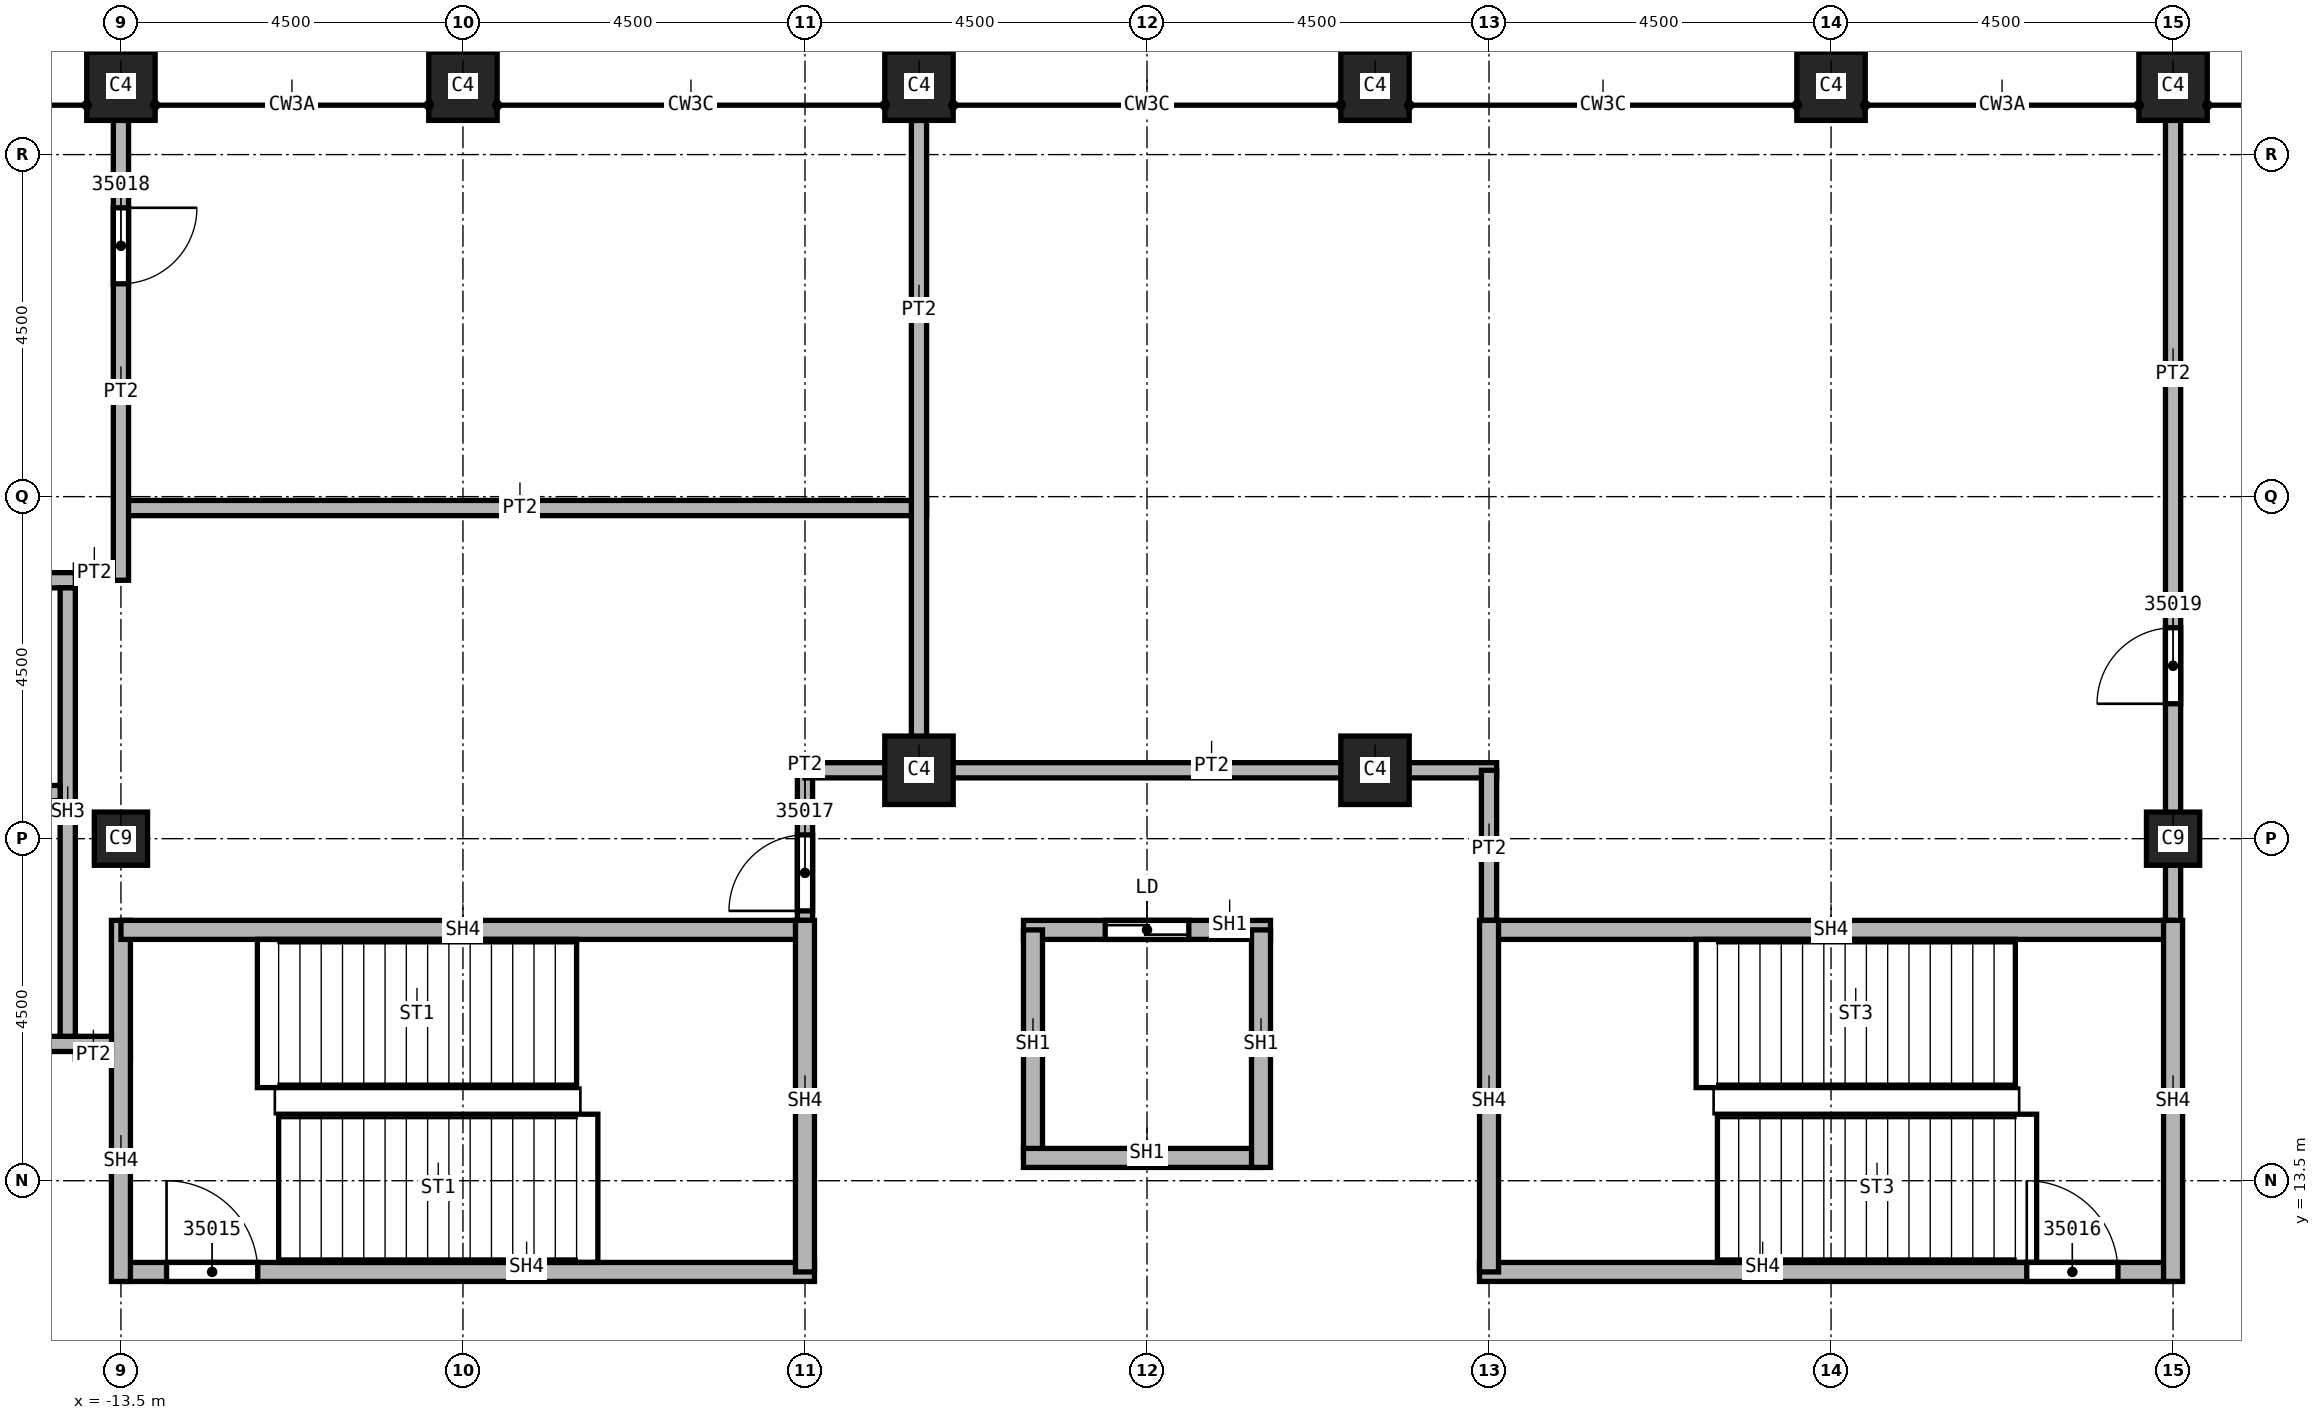
"""IFC4 building model, lengths in metres.
Left out: names, types, materials, properties, quantities, classifications, styles, units other than length and angle.
Written with IfcOpenShell. Run it as: python <this file> out.ifc"""

import sys

from ifc_helpers import new_model, si_unit, direction, frame, frame_2d, origin, origin_2d, place, context, subcontext, project, spatial, rectangle, extrude, element, fill, save


model = new_model("IFC4")
c1 = context("Model", 3, precision=1e-05, world=origin(), true_north=direction((0.0, 1.0)))
c2 = subcontext(c1, "Body", "Model", "MODEL_VIEW")
j1 = project(units=[si_unit("LENGTHUNIT", "METRE"), si_unit("PLANEANGLEUNIT", "RADIAN")], contexts=[c1])
p1 = place(None, origin())
s1 = spatial("IfcSite", under=j1, at=p1, CompositionType="ELEMENT")
p2 = place(p1, origin())
s2 = spatial("IfcBuilding", under=s1, at=p2, CompositionType="ELEMENT")
p3 = place(p2, frame((0.0, 0.0, 376.0)))
s3 = spatial("IfcBuildingStorey", under=s2, at=p3, CompositionType="ELEMENT", Elevation=376.0)
for number, where, z_axis, x_axis in (
    (1, (13.5, 18.0, 0.0), (0.0, 0.0, 1.0), (1.0, 0.0, 0.0)),
    (2, (-13.5, 18.0, 0.0), (0.0, 0.0, 1.0), (1.0, 0.0, 0.0)),
):
    element("IfcColumn", number, at=place(p3, frame(where, z_axis=z_axis, x_axis=x_axis)), inside=s3, PredefinedType="COLUMN", context=c2, shape_type="SweptSolid", body=[
        extrude(rectangle(XDim=0.7, YDim=0.7, at=origin_2d()), origin(), (0.0, 0.0, 1.0), 4.6),
    ])
for number, where, z_axis, x_axis in (
    (3, (3.0, 27.9, 0.0), (0.0, 0.0, 1.0), (1.0, 0.0, 0.0)),
    (4, (9.0, 27.9, 0.0), (0.0, 0.0, 1.0), (1.0, 0.0, 0.0)),
    (5, (13.5, 27.9, 0.0), (0.0, 0.0, 1.0), (1.0, 0.0, 0.0)),
    (6, (-3.0, 27.9, 0.0), (0.0, 0.0, 1.0), (1.0, 0.0, 0.0)),
    (7, (-9.0, 27.9, 0.0), (0.0, 0.0, 1.0), (1.0, 0.0, 0.0)),
    (8, (-13.5, 27.9, 0.0), (0.0, 0.0, 1.0), (1.0, 0.0, 0.0)),
    (9, (3.0, 18.9, 0.0), (0.0, 0.0, 1.0), (1.0, 0.0, 0.0)),
    (10, (-3.0, 18.9, 0.0), (0.0, 0.0, 1.0), (1.0, 0.0, 0.0)),
):
    element("IfcColumn", number, at=place(p3, frame(where, z_axis=z_axis, x_axis=x_axis)), inside=s3, PredefinedType="COLUMN", context=c2, shape_type="SweptSolid", body=[
        extrude(rectangle(XDim=0.9, YDim=0.9, at=origin_2d()), origin(), (0.0, 0.0, 1.0), 4.6),
    ])
p4 = place(p3, frame((-14.1, 15.2, 0.0), z_axis=(0.0, 0.0, 1.0), x_axis=(1.0, 0.0, 0.0)))
e11 = element("IfcWall", 11, at=p4, inside=s3, PredefinedType="PARTITIONING", context=c2, shape_type="SweptSolid", body=[
    extrude(rectangle(XDim=0.725, YDim=0.2, at=frame_2d((0.363, 0.0))), origin(), (0.0, 0.0, 1.0), 4.15),
])
p5 = place(p3, frame((-13.5, 21.5, 0.0), z_axis=(0.0, 0.0, 1.0), x_axis=(-1.0, 0.0, 0.0)))
e12 = element("IfcWall", 12, at=p5, inside=s3, PredefinedType="PARTITIONING", context=c2, shape_type="SweptSolid", body=[
    extrude(rectangle(XDim=0.6, YDim=0.2, at=frame_2d((0.3, 0.0))), origin(), (0.0, 0.0, 1.0), 4.15),
])
p6 = place(p3, frame((-13.5, 22.35, 0.0), z_axis=(0.0, 0.0, 1.0), x_axis=(1.0, 0.0, 0.0)))
e13 = element("IfcWall", 13, at=p6, inside=s3, PredefinedType="PARTITIONING", context=c2, shape_type="SweptSolid", body=[
    extrude(rectangle(XDim=10.6, YDim=0.2, at=frame_2d((5.3, 0.0))), origin(), (0.0, 0.0, 1.0), 4.15),
])
p7 = place(p3, frame((-13.5, 27.45, 0.0), z_axis=(0.0, 0.0, 1.0), x_axis=(0.0, -1.0, 0.0)))
e14 = element("IfcWall", 14, at=p7, inside=s3, PredefinedType="PARTITIONING", context=c2, shape_type="SweptSolid", body=[
    extrude(rectangle(XDim=6.05, YDim=0.2, at=frame_2d((3.025, 0.0))), origin(), (0.0, 0.0, 1.0), 4.15),
])
p8 = place(p7, frame((1.15, 0.0, 0.0)))
e15 = element("IfcOpeningElement", 15, at=p8, cuts=e14, PredefinedType="OPENING", context=c2, shape_type="SweptSolid", body=[
    extrude(rectangle(XDim=1.0, YDim=2.1, at=frame_2d((0.5, 1.05))), frame((0.0, 0.1, 0.0), z_axis=(0.0, -1.0, 0.0), x_axis=(1.0, 0.0, 0.0)), (0.0, 0.0, 1.0), 0.2),
])
p9 = place(p3, frame((-4.5, 16.8, 0.0), z_axis=(0.0, 0.0, 1.0), x_axis=(0.0, 1.0, 0.0)))
e16 = element("IfcWall", 16, at=p9, inside=s3, PredefinedType="PARTITIONING", context=c2, shape_type="SweptSolid", body=[
    extrude(rectangle(XDim=2.2, YDim=0.2, at=frame_2d((1.1, 0.0))), origin(), (0.0, 0.0, 1.0), 4.15),
])
p10 = place(p9, frame((0.25, 0.0, 0.0)))
e17 = element("IfcOpeningElement", 17, at=p10, cuts=e16, PredefinedType="OPENING", context=c2, shape_type="SweptSolid", body=[
    extrude(rectangle(XDim=1.0, YDim=2.1, at=frame_2d((0.5, 1.05))), frame((0.0, 0.1, 0.0), z_axis=(0.0, -1.0, 0.0), x_axis=(1.0, 0.0, 0.0)), (0.0, 0.0, 1.0), 0.2),
])
p11 = place(p3, frame((-4.5, 18.9, 0.0), z_axis=(0.0, 0.0, 1.0), x_axis=(1.0, 0.0, 0.0)))
e18 = element("IfcWall", 18, at=p11, inside=s3, PredefinedType="PARTITIONING", context=c2, shape_type="SweptSolid", body=[
    extrude(rectangle(XDim=9.1, YDim=0.2, at=frame_2d((4.55, 0.0))), origin(), (0.0, 0.0, 1.0), 4.15),
])
p12 = place(p3, frame((-3.0, 27.45, 0.0), z_axis=(0.0, 0.0, 1.0), x_axis=(0.0, -1.0, 0.0)))
e19 = element("IfcWall", 19, at=p12, inside=s3, PredefinedType="PARTITIONING", context=c2, shape_type="SweptSolid", body=[
    extrude(rectangle(XDim=8.55, YDim=0.2, at=frame_2d((4.275, 0.0))), origin(), (0.0, 0.0, 1.0), 4.15),
])
p13 = place(p3, frame((4.5, 18.9, 0.0), z_axis=(0.0, 0.0, 1.0), x_axis=(0.0, -1.0, 0.0)))
e20 = element("IfcWall", 20, at=p13, inside=s3, PredefinedType="PARTITIONING", context=c2, shape_type="SweptSolid", body=[
    extrude(rectangle(XDim=2.1, YDim=0.2, at=frame_2d((1.05, 0.0))), origin(), (0.0, 0.0, 1.0), 4.15),
])
p14 = place(p3, frame((13.5, 16.675, 0.0), z_axis=(0.0, 0.0, 1.0), x_axis=(0.0, 1.0, 0.0)))
e21 = element("IfcWall", 21, at=p14, inside=s3, PredefinedType="PARTITIONING", context=c2, shape_type="SweptSolid", body=[
    extrude(rectangle(XDim=10.775, YDim=0.2, at=frame_2d((5.387, 0.0))), origin(), (0.0, 0.0, 1.0), 4.15),
])
p15 = place(p14, frame((3.1, 0.0, 0.0)))
e22 = element("IfcOpeningElement", 22, at=p15, cuts=e21, PredefinedType="OPENING", context=c2, shape_type="SweptSolid", body=[
    extrude(rectangle(XDim=1.0, YDim=2.1, at=frame_2d((0.5, 1.05))), frame((0.0, 0.1, 0.0), z_axis=(0.0, -1.0, 0.0), x_axis=(1.0, 0.0, 0.0)), (0.0, 0.0, 1.0), 0.2),
])
p16 = place(p3, frame((-1.625, 16.8, 0.0), z_axis=(0.0, 0.0, 1.0), x_axis=(1.0, 0.0, 0.0)))
e23 = element("IfcWall", 23, at=p16, inside=s3, PredefinedType="SOLIDWALL", context=c2, shape_type="SweptSolid", body=[
    extrude(rectangle(XDim=3.25, YDim=0.25, at=frame_2d((1.625, 0.0))), origin(), (0.0, 0.0, 1.0), 4.15),
])
p17 = place(p16, frame((1.075, 0.0, 0.0)))
e24 = element("IfcOpeningElement", 24, at=p17, cuts=e23, PredefinedType="OPENING", context=c2, shape_type="SweptSolid", body=[
    extrude(rectangle(XDim=1.1, YDim=2.1, at=frame_2d((0.55, 1.05))), frame((0.0, 0.125, 0.0), z_axis=(0.0, -1.0, 0.0), x_axis=(1.0, 0.0, 0.0)), (0.0, 0.0, 1.0), 0.25),
])
p18 = place(p3, frame((-1.5, 13.8, 0.0), z_axis=(0.0, 0.0, 1.0), x_axis=(0.0, 1.0, 0.0)))
e25 = element("IfcWall", 25, at=p18, inside=s3, PredefinedType="SOLIDWALL", context=c2, shape_type="SweptSolid", body=[
    extrude(rectangle(XDim=3.0, YDim=0.25, at=frame_2d((1.5, 0.0))), origin(), (0.0, 0.0, 1.0), 4.15),
])
for number, where, z_axis, x_axis in (
    (26, (1.5, 13.8, 0.0), (0.0, 0.0, 1.0), (-1.0, 0.0, 0.0)),
    (27, (1.5, 16.8, 0.0), (0.0, 0.0, 1.0), (0.0, -1.0, 0.0)),
):
    element("IfcWall", number, at=place(p3, frame(where, z_axis=z_axis, x_axis=x_axis)), inside=s3, PredefinedType="SOLIDWALL", context=c2, shape_type="SweptSolid", body=[
        extrude(rectangle(XDim=3.125, YDim=0.25, at=frame_2d((1.562, 0.0))), origin(), (0.0, 0.0, 1.0), 4.15),
    ])
p19 = place(p3, frame((-13.5, 12.3, 0.0), z_axis=(0.0, 0.0, 1.0), x_axis=(1.0, 0.0, 0.0)))
e28 = element("IfcWall", 28, at=p19, inside=s3, PredefinedType="SOLIDWALL", context=c2, shape_type="SweptSolid", body=[
    extrude(rectangle(XDim=9.125, YDim=0.25, at=frame_2d((4.562, 0.0))), origin(), (0.0, 0.0, 1.0), 4.15),
])
p20 = place(p19, frame((0.6, 0.0, 0.0)))
e29 = element("IfcOpeningElement", 29, at=p20, cuts=e28, PredefinedType="OPENING", context=c2, shape_type="SweptSolid", body=[
    extrude(rectangle(XDim=1.2, YDim=2.1, at=frame_2d((0.6, 1.05))), frame((0.0, 0.125, 0.0), z_axis=(0.0, -1.0, 0.0), x_axis=(1.0, 0.0, 0.0)), (0.0, 0.0, 1.0), 0.25),
])
p21 = place(p3, frame((-13.5, 12.175, 0.0), z_axis=(0.0, 0.0, 1.0), x_axis=(0.0, 1.0, 0.0)))
e30 = element("IfcWall", 30, at=p21, inside=s3, PredefinedType="SOLIDWALL", context=c2, shape_type="SweptSolid", body=[
    extrude(rectangle(XDim=4.75, YDim=0.25, at=frame_2d((2.375, 0.0))), origin(), (0.0, 0.0, 1.0), 4.15),
])
p22 = place(p3, frame((-13.5, 16.8, 0.0), z_axis=(0.0, 0.0, 1.0), x_axis=(1.0, 0.0, 0.0)))
e31 = element("IfcWall", 31, at=p22, inside=s3, PredefinedType="SOLIDWALL", context=c2, shape_type="SweptSolid", body=[
    extrude(rectangle(XDim=9.1, YDim=0.25, at=frame_2d((4.55, 0.0))), origin(), (0.0, 0.0, 1.0), 4.15),
])
p23 = place(p3, frame((-4.5, 16.925, 0.0), z_axis=(0.0, 0.0, 1.0), x_axis=(0.0, -1.0, 0.0)))
e32 = element("IfcWall", 32, at=p23, inside=s3, PredefinedType="SOLIDWALL", context=c2, shape_type="SweptSolid", body=[
    extrude(rectangle(XDim=4.625, YDim=0.25, at=frame_2d((2.312, 0.0))), origin(), (0.0, 0.0, 1.0), 4.15),
])
p24 = place(p3, frame((4.375, 12.3, 0.0), z_axis=(0.0, 0.0, 1.0), x_axis=(1.0, 0.0, 0.0)))
e33 = element("IfcWall", 33, at=p24, inside=s3, PredefinedType="SOLIDWALL", context=c2, shape_type="SweptSolid", body=[
    extrude(rectangle(XDim=9.125, YDim=0.25, at=frame_2d((4.562, 0.0))), origin(), (0.0, 0.0, 1.0), 4.15),
])
p25 = place(p24, frame((7.2, 0.0, 0.0)))
e34 = element("IfcOpeningElement", 34, at=p25, cuts=e33, PredefinedType="OPENING", context=c2, shape_type="SweptSolid", body=[
    extrude(rectangle(XDim=1.2, YDim=2.1, at=frame_2d((0.6, 1.05))), frame((0.0, 0.125, 0.0), z_axis=(0.0, -1.0, 0.0), x_axis=(1.0, 0.0, 0.0)), (0.0, 0.0, 1.0), 0.25),
])
p26 = place(p3, frame((4.4, 16.8, 0.0), z_axis=(0.0, 0.0, 1.0), x_axis=(1.0, 0.0, 0.0)))
e35 = element("IfcWall", 35, at=p26, inside=s3, PredefinedType="SOLIDWALL", context=c2, shape_type="SweptSolid", body=[
    extrude(rectangle(XDim=9.1, YDim=0.25, at=frame_2d((4.55, 0.0))), origin(), (0.0, 0.0, 1.0), 4.15),
])
p27 = place(p3, frame((4.5, 12.3, 0.0), z_axis=(0.0, 0.0, 1.0), x_axis=(0.0, 1.0, 0.0)))
e36 = element("IfcWall", 36, at=p27, inside=s3, PredefinedType="SOLIDWALL", context=c2, shape_type="SweptSolid", body=[
    extrude(rectangle(XDim=4.625, YDim=0.25, at=frame_2d((2.312, 0.0))), origin(), (0.0, 0.0, 1.0), 4.15),
])
p28 = place(p3, frame((13.5, 12.175, 0.0), z_axis=(0.0, 0.0, 1.0), x_axis=(0.0, 1.0, 0.0)))
e37 = element("IfcWall", 37, at=p28, inside=s3, PredefinedType="SOLIDWALL", context=c2, shape_type="SweptSolid", body=[
    extrude(rectangle(XDim=4.75, YDim=0.25, at=frame_2d((2.375, 0.0))), origin(), (0.0, 0.0, 1.0), 4.15),
])
p29 = place(p3, frame((-21.9, 15.3, 0.0), z_axis=(0.0, 0.0, 1.0), x_axis=(1.0, 0.0, 0.0)))
e38 = element("IfcWall", 38, at=p29, inside=s3, PredefinedType="SOLIDWALL", context=c2, shape_type="SweptSolid", body=[
    extrude(rectangle(XDim=8.275, YDim=0.2, at=frame_2d((4.137, 0.0))), origin(), (0.0, 0.0, 1.0), 4.15),
])
p30 = place(p29, frame((4.8, 0.0, 0.0)))
e39 = element("IfcOpeningElement", 39, at=p30, cuts=e38, PredefinedType="OPENING", context=c2, shape_type="SweptSolid", body=[
    extrude(rectangle(XDim=1.2, YDim=2.1, at=frame_2d((0.6, 1.05))), frame((0.0, 0.1, 0.0), z_axis=(0.0, -1.0, 0.0), x_axis=(1.0, 0.0, 0.0)), (0.0, 0.0, 1.0), 0.2),
])
p31 = place(p3, frame((-21.9, 21.4, 0.0), z_axis=(0.0, 0.0, 1.0), x_axis=(1.0, 0.0, 0.0)))
e40 = element("IfcWall", 40, at=p31, inside=s3, PredefinedType="SOLIDWALL", context=c2, shape_type="SweptSolid", body=[
    extrude(rectangle(XDim=7.8, YDim=0.2, at=frame_2d((3.9, 0.0))), origin(), (0.0, 0.0, 1.0), 4.15),
])
p32 = place(p31, frame((3.2, 0.0, 0.0)))
e41 = element("IfcOpeningElement", 41, at=p32, cuts=e40, PredefinedType="OPENING", context=c2, shape_type="SweptSolid", body=[
    extrude(rectangle(XDim=1.2, YDim=2.1, at=frame_2d((0.6, 1.05))), frame((0.0, 0.1, 0.0), z_axis=(0.0, -1.0, 0.0), x_axis=(1.0, 0.0, 0.0)), (0.0, 0.0, 1.0), 0.2),
])
p33 = place(p3, frame((-14.2, 15.4, 0.0), z_axis=(0.0, 0.0, 1.0), x_axis=(0.0, 1.0, 0.0)))
e42 = element("IfcWall", 42, at=p33, inside=s3, PredefinedType="SOLIDWALL", context=c2, shape_type="SweptSolid", body=[
    extrude(rectangle(XDim=5.9, YDim=0.2, at=frame_2d((2.95, 0.0))), origin(), (0.0, 0.0, 1.0), 4.15),
])
p34 = place(p3, frame((-17.1, 18.6, 0.0), z_axis=(0.0, 0.0, 1.0), x_axis=(1.0, 0.0, 0.0)))
e43 = element("IfcWall", 43, at=p34, inside=s3, PredefinedType="SOLIDWALL", context=c2, shape_type="SweptSolid", body=[
    extrude(rectangle(XDim=2.8, YDim=0.2, at=frame_2d((1.4, 0.0))), origin(), (0.0, 0.0, 1.0), 4.15),
])
p35 = place(p34, frame((0.85, 0.0, 0.0)))
e44 = element("IfcOpeningElement", 44, at=p35, cuts=e43, PredefinedType="OPENING", context=c2, shape_type="SweptSolid", body=[
    extrude(rectangle(XDim=1.1, YDim=2.1, at=frame_2d((0.55, 1.05))), frame((0.0, 0.1, 0.0), z_axis=(0.0, -1.0, 0.0), x_axis=(1.0, 0.0, 0.0)), (0.0, 0.0, 1.0), 0.2),
])
p36 = place(p20, origin())
e45 = element("IfcDoor", 45, at=p36, inside=s3, OperationType="SINGLE_SWING_RIGHT", PredefinedType="DOOR", context=c2, shape_type="SweptSolid", body=[
    extrude(rectangle(XDim=1.2, YDim=2.1, at=frame_2d((0.6, 1.05))), frame((0.0, 0.025, 0.0), z_axis=(0.0, -1.0, 0.0), x_axis=(1.0, 0.0, 0.0)), (0.0, 0.0, 1.0), 0.05),
])
fill(e29, e45)
p37 = place(p25, origin())
e46 = element("IfcDoor", 46, at=p37, inside=s3, OperationType="SINGLE_SWING_LEFT", PredefinedType="DOOR", context=c2, shape_type="SweptSolid", body=[
    extrude(rectangle(XDim=1.2, YDim=2.1, at=frame_2d((0.6, 1.05))), frame((0.0, 0.025, 0.0), z_axis=(0.0, -1.0, 0.0), x_axis=(1.0, 0.0, 0.0)), (0.0, 0.0, 1.0), 0.05),
])
fill(e34, e46)
p38 = place(p10, origin())
e47 = element("IfcDoor", 47, at=p38, inside=s3, OperationType="SINGLE_SWING_RIGHT", PredefinedType="DOOR", context=c2, shape_type="SweptSolid", body=[
    extrude(rectangle(XDim=1.0, YDim=2.1, at=frame_2d((0.5, 1.05))), frame((0.0, 0.025, 0.0), z_axis=(0.0, -1.0, 0.0), x_axis=(1.0, 0.0, 0.0)), (0.0, 0.0, 1.0), 0.05),
])
fill(e17, e47)
p39 = place(p8, origin())
e48 = element("IfcDoor", 48, at=p39, inside=s3, OperationType="SINGLE_SWING_LEFT", PredefinedType="DOOR", context=c2, shape_type="SweptSolid", body=[
    extrude(rectangle(XDim=1.0, YDim=2.1, at=frame_2d((0.5, 1.05))), frame((0.0, 0.025, 0.0), z_axis=(0.0, -1.0, 0.0), x_axis=(1.0, 0.0, 0.0)), (0.0, 0.0, 1.0), 0.05),
])
fill(e15, e48)
p40 = place(p15, origin())
e49 = element("IfcDoor", 49, at=p40, inside=s3, OperationType="SINGLE_SWING_RIGHT", PredefinedType="DOOR", context=c2, shape_type="SweptSolid", body=[
    extrude(rectangle(XDim=1.0, YDim=2.1, at=frame_2d((0.5, 1.05))), frame((0.0, 0.025, 0.0), z_axis=(0.0, -1.0, 0.0), x_axis=(1.0, 0.0, 0.0)), (0.0, 0.0, 1.0), 0.05),
])
fill(e22, e49)
p41 = place(p17, origin())
e50 = element("IfcDoor", 50, at=p41, inside=s3, OperationType="SLIDING_TO_LEFT", PredefinedType="DOOR", context=c2, shape_type="SweptSolid", body=[
    extrude(rectangle(XDim=1.1, YDim=2.1, at=frame_2d((0.55, 1.05))), frame((0.0, 0.025, 0.0), z_axis=(0.0, -1.0, 0.0), x_axis=(1.0, 0.0, 0.0)), (0.0, 0.0, 1.0), 0.05),
])
fill(e24, e50)
save(model, sys.argv[1])
